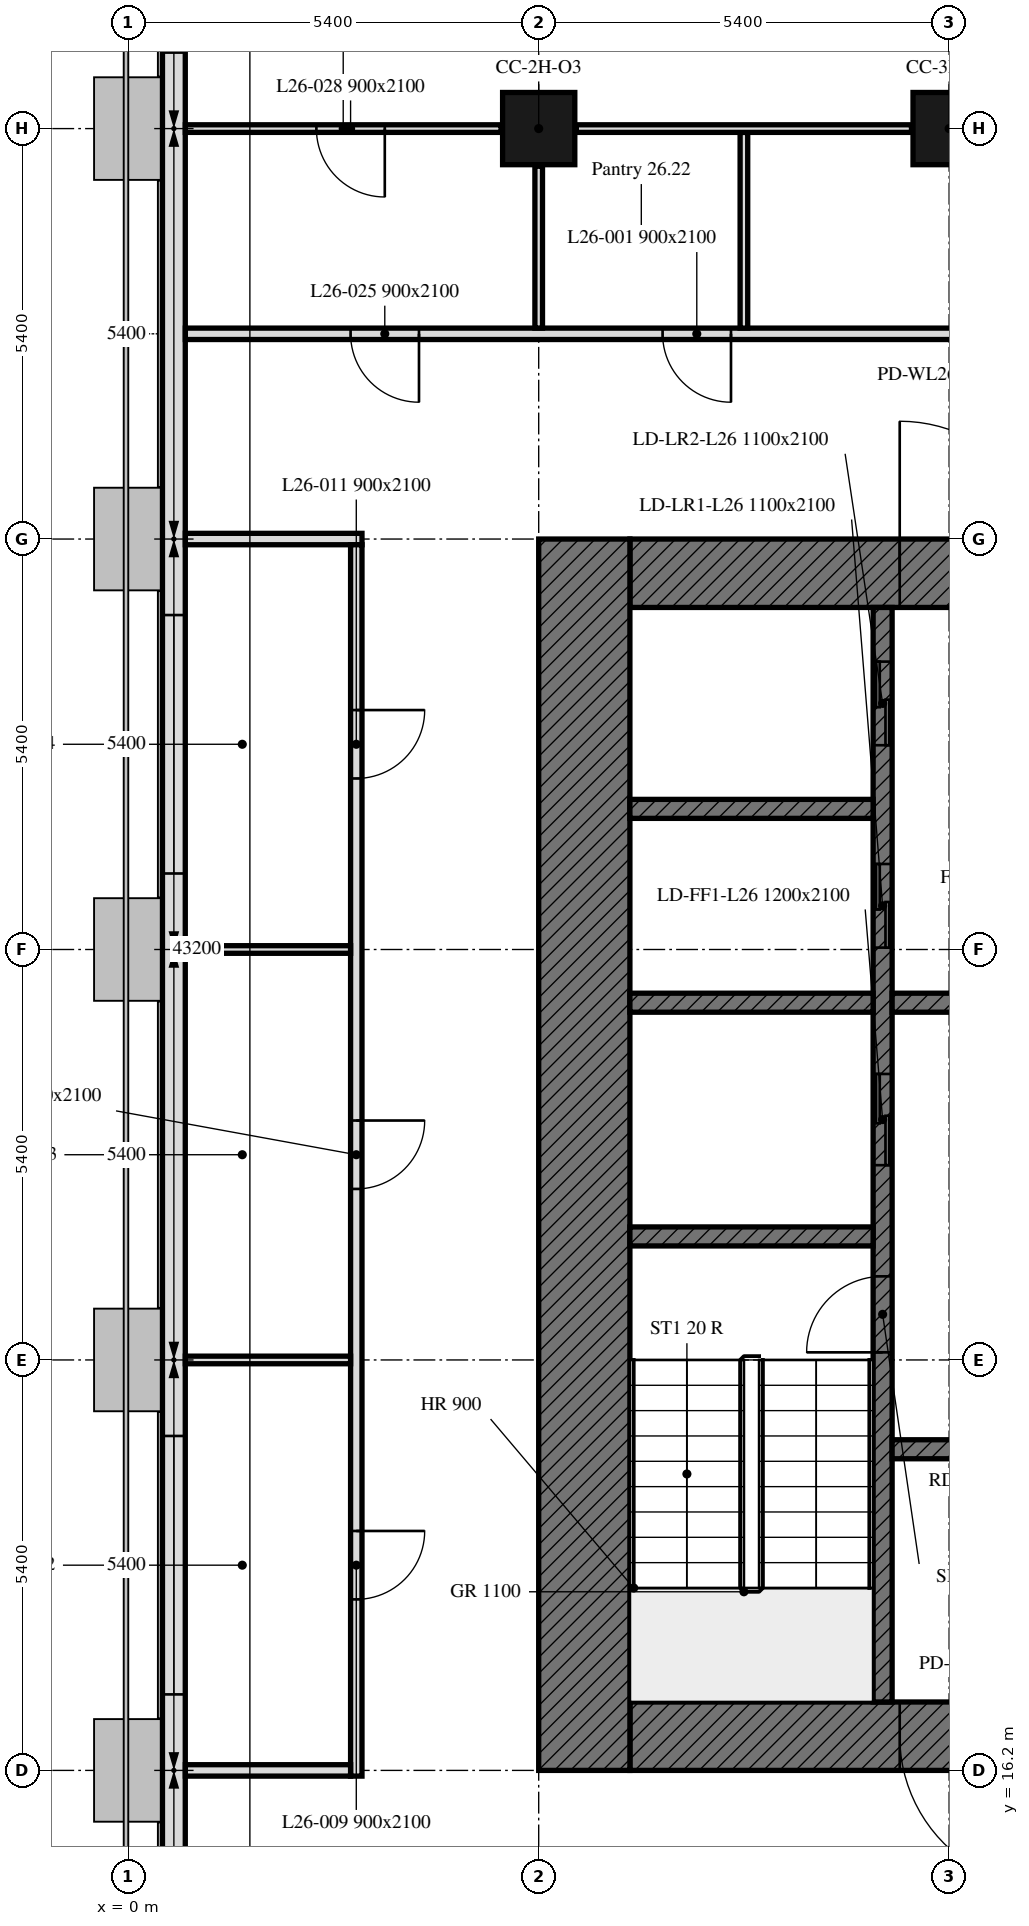
"""IFC4 building model, lengths in metres.
Left out: names, types, materials, properties, quantities, classifications, styles, units other than length and angle.
Written with IfcOpenShell. Run it as: python <this file> out.ifc"""

import sys

from ifc_helpers import new_model, si_unit, direction, frame, frame_2d, origin, origin_2d, place, context, subcontext, project, spatial, rectangle, extrude, element, fill, save


model = new_model("IFC4")
c1 = context("Model", 3, precision=1e-05, world=origin(), true_north=direction((0.0, 1.0)))
c2 = subcontext(c1, "Body", "Model", "MODEL_VIEW")
j1 = project(units=[si_unit("LENGTHUNIT", "METRE"), si_unit("PLANEANGLEUNIT", "RADIAN")], contexts=[c1])
p1 = place(None, origin())
s1 = spatial("IfcSite", under=j1, at=p1, CompositionType="ELEMENT")
p2 = place(p1, origin())
s2 = spatial("IfcBuilding", under=s1, at=p2, CompositionType="ELEMENT")
p3 = place(p2, frame((0.0, 0.0, 110.6)))
s3 = spatial("IfcBuildingStorey", under=s2, at=p3, CompositionType="ELEMENT", Elevation=110.6)
for number, where, z_axis, x_axis in (
    (1, (5.4, 37.8, 0.0), (0.0, 0.0, 1.0), (1.0, 0.0, 0.0)),
    (2, (10.8, 37.8, 0.0), (0.0, 0.0, 1.0), (1.0, 0.0, 0.0)),
):
    element("IfcColumn", number, at=place(p3, frame(where, z_axis=z_axis, x_axis=x_axis)), inside=s3, PredefinedType="COLUMN", context=c2, shape_type="SweptSolid", body=[
        extrude(rectangle(XDim=0.95, YDim=0.95, at=origin_2d()), origin(), (0.0, 0.0, 1.0), 3.5),
    ])
p4 = place(p3, frame((0.6, 43.014, 0.0), z_axis=(0.0, 0.0, 1.0), x_axis=(0.0, -1.0, 0.0)))
e3 = element("IfcWall", 3, at=p4, inside=s3, PredefinedType="SOLIDWALL", context=c2, shape_type="SweptSolid", body=[
    extrude(rectangle(XDim=32.027, YDim=0.3, at=frame_2d((16.014, 0.0))), origin(), (0.0, 0.0, 1.0), 3.5),
])
p5 = place(p4, frame((0.814, 0.0, 0.9)))
e4 = element("IfcOpeningElement", 4, at=p5, cuts=e3, PredefinedType="OPENING", context=c2, shape_type="SweptSolid", body=[
    extrude(rectangle(XDim=3.4, YDim=1.7, at=frame_2d((1.7, 0.85))), frame((0.0, 0.16, 0.0), z_axis=(0.0, -1.0, 0.0), x_axis=(1.0, 0.0, 0.0)), (0.0, 0.0, 1.0), 0.32),
])
p6 = place(p4, frame((11.614, 0.0, 0.9)))
e5 = element("IfcOpeningElement", 5, at=p6, cuts=e3, PredefinedType="OPENING", context=c2, shape_type="SweptSolid", body=[
    extrude(rectangle(XDim=3.4, YDim=1.7, at=frame_2d((1.7, 0.85))), frame((0.0, 0.16, 0.0), z_axis=(0.0, -1.0, 0.0), x_axis=(1.0, 0.0, 0.0)), (0.0, 0.0, 1.0), 0.32),
])
p7 = place(p4, frame((22.414, 0.0, 0.9)))
e6 = element("IfcOpeningElement", 6, at=p7, cuts=e3, PredefinedType="OPENING", context=c2, shape_type="SweptSolid", body=[
    extrude(rectangle(XDim=3.4, YDim=1.7, at=frame_2d((1.7, 0.85))), frame((0.0, 0.16, 0.0), z_axis=(0.0, -1.0, 0.0), x_axis=(1.0, 0.0, 0.0)), (0.0, 0.0, 1.0), 0.32),
])
p8 = place(p3, frame((17.7, 16.65, 0.0), z_axis=(0.0, 0.0, 1.0), x_axis=(-1.0, 0.0, 0.0)))
e7 = element("IfcWall", 7, at=p8, inside=s3, PredefinedType="SOLIDWALL", context=c2, shape_type="SweptSolid", body=[
    extrude(rectangle(XDim=11.1, YDim=0.9, at=frame_2d((5.55, 0.0))), origin(), (0.0, 0.0, 1.0), 3.5),
])
p9 = place(p8, frame((5.55, 0.0, 0.0)))
e8 = element("IfcOpeningElement", 8, at=p9, cuts=e7, PredefinedType="OPENING", context=c2, shape_type="SweptSolid", body=[
    extrude(rectangle(XDim=2.0, YDim=2.4, at=frame_2d((1.0, 1.2))), frame((0.0, 0.45, 0.0), z_axis=(0.0, -1.0, 0.0), x_axis=(1.0, 0.0, 0.0)), (0.0, 0.0, 1.0), 0.9),
])
p10 = place(p3, frame((6.6, 31.95, 0.0), z_axis=(0.0, 0.0, 1.0), x_axis=(1.0, 0.0, 0.0)))
e9 = element("IfcWall", 9, at=p10, inside=s3, PredefinedType="SOLIDWALL", context=c2, shape_type="SweptSolid", body=[
    extrude(rectangle(XDim=11.1, YDim=0.9, at=frame_2d((5.55, 0.0))), origin(), (0.0, 0.0, 1.0), 3.5),
])
p11 = place(p10, frame((3.55, 0.0, 0.0)))
e10 = element("IfcOpeningElement", 10, at=p11, cuts=e9, PredefinedType="OPENING", context=c2, shape_type="SweptSolid", body=[
    extrude(rectangle(XDim=2.0, YDim=2.4, at=frame_2d((1.0, 1.2))), frame((0.0, 0.45, 0.0), z_axis=(0.0, -1.0, 0.0), x_axis=(1.0, 0.0, 0.0)), (0.0, 0.0, 1.0), 0.9),
])
p12 = place(p3, frame((6.0, 16.2, 0.0), z_axis=(0.0, 0.0, 1.0), x_axis=(0.0, 1.0, 0.0)))
e11 = element("IfcWall", 11, at=p12, inside=s3, PredefinedType="SOLIDWALL", context=c2, shape_type="SweptSolid", body=[
    extrude(rectangle(XDim=16.2, YDim=1.2, at=frame_2d((8.1, 0.0))), origin(), (0.0, 0.0, 1.0), 3.5),
])
p13 = place(p3, frame((9.925, 17.1, 0.0), z_axis=(0.0, 0.0, 1.0), x_axis=(0.0, 1.0, 0.0)))
e12 = element("IfcWall", 12, at=p13, inside=s3, PredefinedType="SOLIDWALL", context=c2, shape_type="SweptSolid", body=[
    extrude(rectangle(XDim=14.4, YDim=0.25, at=frame_2d((7.2, 0.0))), origin(), (0.0, 0.0, 1.0), 3.5),
])
p14 = place(p13, frame((4.6, 0.0, 0.0)))
e13 = element("IfcOpeningElement", 13, at=p14, cuts=e12, PredefinedType="OPENING", context=c2, shape_type="SweptSolid", body=[
    extrude(rectangle(XDim=1.0, YDim=2.1, at=frame_2d((0.5, 1.05))), frame((0.0, 0.125, 0.0), z_axis=(0.0, -1.0, 0.0), x_axis=(1.0, 0.0, 0.0)), (0.0, 0.0, 1.0), 0.25),
])
p15 = place(p13, frame((7.062, 0.0, 0.0)))
e14 = element("IfcOpeningElement", 14, at=p15, cuts=e12, PredefinedType="OPENING", context=c2, shape_type="SweptSolid", body=[
    extrude(rectangle(XDim=1.2, YDim=2.1, at=frame_2d((0.6, 1.05))), frame((0.0, 0.125, 0.0), z_axis=(0.0, -1.0, 0.0), x_axis=(1.0, 0.0, 0.0)), (0.0, 0.0, 1.0), 0.25),
])
p16 = place(p13, frame((9.925, 0.0, 0.0)))
e15 = element("IfcOpeningElement", 15, at=p16, cuts=e12, PredefinedType="OPENING", context=c2, shape_type="SweptSolid", body=[
    extrude(rectangle(XDim=1.1, YDim=2.1, at=frame_2d((0.55, 1.05))), frame((0.0, 0.125, 0.0), z_axis=(0.0, -1.0, 0.0), x_axis=(1.0, 0.0, 0.0)), (0.0, 0.0, 1.0), 0.25),
])
p17 = place(p13, frame((12.587, 0.0, 0.0)))
e16 = element("IfcOpeningElement", 16, at=p17, cuts=e12, PredefinedType="OPENING", context=c2, shape_type="SweptSolid", body=[
    extrude(rectangle(XDim=1.1, YDim=2.1, at=frame_2d((0.55, 1.05))), frame((0.0, 0.125, 0.0), z_axis=(0.0, -1.0, 0.0), x_axis=(1.0, 0.0, 0.0)), (0.0, 0.0, 1.0), 0.25),
])
for number, where, z_axis, x_axis in (
    (17, (6.6, 23.225, 0.0), (0.0, 0.0, 1.0), (1.0, 0.0, 0.0)),
    (18, (6.6, 26.3, 0.0), (0.0, 0.0, 1.0), (1.0, 0.0, 0.0)),
):
    element("IfcWall", number, at=place(p3, frame(where, z_axis=z_axis, x_axis=x_axis)), inside=s3, PredefinedType="SOLIDWALL", context=c2, shape_type="SweptSolid", body=[
        extrude(rectangle(XDim=3.2, YDim=0.25, at=frame_2d((1.6, 0.0))), origin(), (0.0, 0.0, 1.0), 3.5),
    ])
for number, where, z_axis, x_axis in (
    (19, (10.05, 26.3, 0.0), (0.0, 0.0, 1.0), (1.0, 0.0, 0.0)),
    (20, (10.05, 20.425, 0.0), (0.0, 0.0, 1.0), (1.0, 0.0, 0.0)),
):
    element("IfcWall", number, at=place(p3, frame(where, z_axis=z_axis, x_axis=x_axis)), inside=s3, PredefinedType="SOLIDWALL", context=c2, shape_type="SweptSolid", body=[
        extrude(rectangle(XDim=2.75, YDim=0.25, at=frame_2d((1.375, 0.0))), origin(), (0.0, 0.0, 1.0), 3.5),
    ])
p18 = place(p3, frame((6.6, 28.85, 0.0), z_axis=(0.0, 0.0, 1.0), x_axis=(1.0, 0.0, 0.0)))
e21 = element("IfcWall", 21, at=p18, inside=s3, PredefinedType="SOLIDWALL", context=c2, shape_type="SweptSolid", body=[
    extrude(rectangle(XDim=3.2, YDim=0.25, at=frame_2d((1.6, 0.0))), origin(), (0.0, 0.0, 1.0), 3.5),
])
p19 = place(p3, frame((24.2, 35.1, 0.0), z_axis=(0.0, 0.0, 1.0), x_axis=(-1.0, 0.0, 0.0)))
e22 = element("IfcWall", 22, at=p19, inside=s3, PredefinedType="PARTITIONING", context=c2, shape_type="SweptSolid", body=[
    extrude(rectangle(XDim=23.449, YDim=0.15, at=frame_2d((11.725, 0.0))), origin(), (0.0, 0.0, 1.0), 2.75),
])
p20 = place(p19, frame((16.27, 0.0, 0.0)))
e23 = element("IfcOpeningElement", 23, at=p20, cuts=e22, PredefinedType="OPENING", context=c2, shape_type="SweptSolid", body=[
    extrude(rectangle(XDim=0.9, YDim=2.1, at=frame_2d((0.45, 1.05))), frame((0.0, 0.075, 0.0), z_axis=(0.0, -1.0, 0.0), x_axis=(1.0, 0.0, 0.0)), (0.0, 0.0, 1.0), 0.15),
])
p21 = place(p19, frame((20.375, 0.0, 0.0)))
e24 = element("IfcOpeningElement", 24, at=p21, cuts=e22, PredefinedType="OPENING", context=c2, shape_type="SweptSolid", body=[
    extrude(rectangle(XDim=0.9, YDim=2.1, at=frame_2d((0.45, 1.05))), frame((0.0, 0.075, 0.0), z_axis=(0.0, -1.0, 0.0), x_axis=(1.0, 0.0, 0.0)), (0.0, 0.0, 1.0), 0.15),
])
p22 = place(p3, frame((0.751, 32.4, 0.0), z_axis=(0.0, 0.0, 1.0), x_axis=(1.0, 0.0, 0.0)))
e25 = element("IfcWall", 25, at=p22, inside=s3, PredefinedType="PARTITIONING", context=c2, shape_type="SweptSolid", body=[
    extrude(rectangle(XDim=2.324, YDim=0.15, at=frame_2d((1.162, 0.0))), origin(), (0.0, 0.0, 1.0), 2.75),
])
p23 = place(p3, frame((3.0, 32.325, 0.0), z_axis=(0.0, 0.0, 1.0), x_axis=(0.0, -1.0, 0.0)))
e26 = element("IfcWall", 26, at=p23, inside=s3, PredefinedType="PARTITIONING", context=c2, shape_type="SweptSolid", body=[
    extrude(rectangle(XDim=16.2, YDim=0.15, at=frame_2d((8.1, 0.0))), origin(), (0.0, 0.0, 1.0), 2.75),
])
p24 = place(p23, frame((12.975, 0.0, 0.0)))
e27 = element("IfcOpeningElement", 27, at=p24, cuts=e26, PredefinedType="OPENING", context=c2, shape_type="SweptSolid", body=[
    extrude(rectangle(XDim=0.9, YDim=2.1, at=frame_2d((0.45, 1.05))), frame((0.0, 0.075, 0.0), z_axis=(0.0, -1.0, 0.0), x_axis=(1.0, 0.0, 0.0)), (0.0, 0.0, 1.0), 0.15),
])
p25 = place(p23, frame((7.575, 0.0, 0.0)))
e28 = element("IfcOpeningElement", 28, at=p25, cuts=e26, PredefinedType="OPENING", context=c2, shape_type="SweptSolid", body=[
    extrude(rectangle(XDim=0.9, YDim=2.1, at=frame_2d((0.45, 1.05))), frame((0.0, 0.075, 0.0), z_axis=(0.0, -1.0, 0.0), x_axis=(1.0, 0.0, 0.0)), (0.0, 0.0, 1.0), 0.15),
])
p26 = place(p23, frame((2.175, 0.0, 0.0)))
e29 = element("IfcOpeningElement", 29, at=p26, cuts=e26, PredefinedType="OPENING", context=c2, shape_type="SweptSolid", body=[
    extrude(rectangle(XDim=0.9, YDim=2.1, at=frame_2d((0.45, 1.05))), frame((0.0, 0.075, 0.0), z_axis=(0.0, -1.0, 0.0), x_axis=(1.0, 0.0, 0.0)), (0.0, 0.0, 1.0), 0.15),
])
p27 = place(p3, frame((2.925, 16.2, 0.0), z_axis=(0.0, 0.0, 1.0), x_axis=(-1.0, 0.0, 0.0)))
e30 = element("IfcWall", 30, at=p27, inside=s3, PredefinedType="PARTITIONING", context=c2, shape_type="SweptSolid", body=[
    extrude(rectangle(XDim=2.174, YDim=0.15, at=frame_2d((1.087, 0.0))), origin(), (0.0, 0.0, 1.0), 2.75),
])
p28 = place(p3, frame((4.905, 37.8, 0.0), z_axis=(0.0, 0.0, 1.0), x_axis=(-1.0, 0.0, 0.0)))
e31 = element("IfcWall", 31, at=p28, inside=s3, PredefinedType="PARTITIONING", context=c2, shape_type="SweptSolid", body=[
    extrude(rectangle(XDim=4.154, YDim=0.1, at=frame_2d((2.077, 0.0))), origin(), (0.0, 0.0, 1.0), 2.75),
])
p29 = place(p28, frame((1.53, 0.0, 0.0)))
e32 = element("IfcOpeningElement", 32, at=p29, cuts=e31, PredefinedType="OPENING", context=c2, shape_type="SweptSolid", body=[
    extrude(rectangle(XDim=0.9, YDim=2.1, at=frame_2d((0.45, 1.05))), frame((0.0, 0.05, 0.0), z_axis=(0.0, -1.0, 0.0), x_axis=(1.0, 0.0, 0.0)), (0.0, 0.0, 1.0), 0.1),
])
p30 = place(p3, frame((5.4, 35.175, 0.0), z_axis=(0.0, 0.0, 1.0), x_axis=(0.0, 1.0, 0.0)))
e33 = element("IfcWall", 33, at=p30, inside=s3, PredefinedType="PARTITIONING", context=c2, shape_type="SweptSolid", body=[
    extrude(rectangle(XDim=2.13, YDim=0.1, at=frame_2d((1.065, 0.0))), origin(), (0.0, 0.0, 1.0), 3.5),
])
p31 = place(p3, frame((8.1, 35.175, 0.0), z_axis=(0.0, 0.0, 1.0), x_axis=(0.0, 1.0, 0.0)))
e34 = element("IfcWall", 34, at=p31, inside=s3, PredefinedType="PARTITIONING", context=c2, shape_type="SweptSolid", body=[
    extrude(rectangle(XDim=2.575, YDim=0.1, at=frame_2d((1.288, 0.0))), origin(), (0.0, 0.0, 1.0), 3.5),
])
p32 = place(p3, frame((10.305, 37.8, 0.0), z_axis=(0.0, 0.0, 1.0), x_axis=(-1.0, 0.0, 0.0)))
e35 = element("IfcWall", 35, at=p32, inside=s3, PredefinedType="PARTITIONING", context=c2, shape_type="SweptSolid", body=[
    extrude(rectangle(XDim=4.41, YDim=0.1, at=frame_2d((2.205, 0.0))), origin(), (0.0, 0.0, 1.0), 2.75),
])
for number, where, z_axis, x_axis in (
    (36, (2.925, 21.6, 0.0), (0.0, 0.0, 1.0), (-1.0, 0.0, 0.0)),
    (37, (2.925, 27.0, 0.0), (0.0, 0.0, 1.0), (-1.0, 0.0, 0.0)),
):
    element("IfcWall", number, at=place(p3, frame(where, z_axis=z_axis, x_axis=x_axis)), inside=s3, PredefinedType="PARTITIONING", context=c2, shape_type="SweptSolid", body=[
        extrude(rectangle(XDim=2.174, YDim=0.1, at=frame_2d((1.087, 0.0))), origin(), (0.0, 0.0, 1.0), 2.75),
    ])
p33 = place(p6, origin())
e38 = element("IfcWindow", 38, at=p33, inside=s3, PartitioningType="SINGLE_PANEL", PredefinedType="WINDOW", context=c2, shape_type="SweptSolid", body=[
    extrude(rectangle(XDim=3.4, YDim=1.7, at=frame_2d((1.7, 0.85))), frame((0.0, 0.03, 0.0), z_axis=(0.0, -1.0, 0.0), x_axis=(1.0, 0.0, 0.0)), (0.0, 0.0, 1.0), 0.06),
])
fill(e5, e38)
p34 = place(p7, origin())
e39 = element("IfcWindow", 39, at=p34, inside=s3, PartitioningType="SINGLE_PANEL", PredefinedType="WINDOW", context=c2, shape_type="SweptSolid", body=[
    extrude(rectangle(XDim=3.4, YDim=1.7, at=frame_2d((1.7, 0.85))), frame((0.0, 0.03, 0.0), z_axis=(0.0, -1.0, 0.0), x_axis=(1.0, 0.0, 0.0)), (0.0, 0.0, 1.0), 0.06),
])
fill(e6, e39)
p35 = place(p9, origin())
e40 = element("IfcDoor", 40, at=p35, inside=s3, OperationType="DOUBLE_DOOR_SINGLE_SWING", PredefinedType="DOOR", context=c2, shape_type="SweptSolid", body=[
    extrude(rectangle(XDim=2.0, YDim=2.4, at=frame_2d((1.0, 1.2))), frame((0.0, 0.025, 0.0), z_axis=(0.0, -1.0, 0.0), x_axis=(1.0, 0.0, 0.0)), (0.0, 0.0, 1.0), 0.05),
])
fill(e8, e40)
p36 = place(p11, origin())
e41 = element("IfcDoor", 41, at=p36, inside=s3, OperationType="DOUBLE_DOOR_SINGLE_SWING", PredefinedType="DOOR", context=c2, shape_type="SweptSolid", body=[
    extrude(rectangle(XDim=2.0, YDim=2.4, at=frame_2d((1.0, 1.2))), frame((0.0, 0.025, 0.0), z_axis=(0.0, -1.0, 0.0), x_axis=(1.0, 0.0, 0.0)), (0.0, 0.0, 1.0), 0.05),
])
fill(e10, e41)
p37 = place(p14, origin())
e42 = element("IfcDoor", 42, at=p37, inside=s3, OperationType="SINGLE_SWING_LEFT", PredefinedType="DOOR", context=c2, shape_type="SweptSolid", body=[
    extrude(rectangle(XDim=1.0, YDim=2.1, at=frame_2d((0.5, 1.05))), frame((0.0, 0.025, 0.0), z_axis=(0.0, -1.0, 0.0), x_axis=(1.0, 0.0, 0.0)), (0.0, 0.0, 1.0), 0.05),
])
fill(e13, e42)
p38 = place(p15, origin())
e43 = element("IfcDoor", 43, at=p38, inside=s3, OperationType="DOUBLE_DOOR_SLIDING", PredefinedType="DOOR", context=c2, shape_type="SweptSolid", body=[
    extrude(rectangle(XDim=1.2, YDim=2.1, at=frame_2d((0.6, 1.05))), frame((0.0, 0.025, 0.0), z_axis=(0.0, -1.0, 0.0), x_axis=(1.0, 0.0, 0.0)), (0.0, 0.0, 1.0), 0.05),
])
fill(e14, e43)
p39 = place(p16, origin())
e44 = element("IfcDoor", 44, at=p39, inside=s3, OperationType="DOUBLE_DOOR_SLIDING", PredefinedType="DOOR", context=c2, shape_type="SweptSolid", body=[
    extrude(rectangle(XDim=1.1, YDim=2.1, at=frame_2d((0.55, 1.05))), frame((0.0, 0.025, 0.0), z_axis=(0.0, -1.0, 0.0), x_axis=(1.0, 0.0, 0.0)), (0.0, 0.0, 1.0), 0.05),
])
fill(e15, e44)
p40 = place(p17, origin())
e45 = element("IfcDoor", 45, at=p40, inside=s3, OperationType="DOUBLE_DOOR_SLIDING", PredefinedType="DOOR", context=c2, shape_type="SweptSolid", body=[
    extrude(rectangle(XDim=1.1, YDim=2.1, at=frame_2d((0.55, 1.05))), frame((0.0, 0.025, 0.0), z_axis=(0.0, -1.0, 0.0), x_axis=(1.0, 0.0, 0.0)), (0.0, 0.0, 1.0), 0.05),
])
fill(e16, e45)
p41 = place(p20, origin())
e46 = element("IfcDoor", 46, at=p41, inside=s3, OperationType="SINGLE_SWING_LEFT", PredefinedType="DOOR", context=c2, shape_type="SweptSolid", body=[
    extrude(rectangle(XDim=0.9, YDim=2.1, at=frame_2d((0.45, 1.05))), frame((0.0, 0.025, 0.0), z_axis=(0.0, -1.0, 0.0), x_axis=(1.0, 0.0, 0.0)), (0.0, 0.0, 1.0), 0.05),
])
fill(e23, e46)
p42 = place(p24, origin())
e47 = element("IfcDoor", 47, at=p42, inside=s3, OperationType="SINGLE_SWING_RIGHT", PredefinedType="DOOR", context=c2, shape_type="SweptSolid", body=[
    extrude(rectangle(XDim=0.9, YDim=2.1, at=frame_2d((0.45, 1.05))), frame((0.0, 0.025, 0.0), z_axis=(0.0, -1.0, 0.0), x_axis=(1.0, 0.0, 0.0)), (0.0, 0.0, 1.0), 0.05),
])
fill(e27, e47)
p43 = place(p25, origin())
e48 = element("IfcDoor", 48, at=p43, inside=s3, OperationType="SINGLE_SWING_RIGHT", PredefinedType="DOOR", context=c2, shape_type="SweptSolid", body=[
    extrude(rectangle(XDim=0.9, YDim=2.1, at=frame_2d((0.45, 1.05))), frame((0.0, 0.025, 0.0), z_axis=(0.0, -1.0, 0.0), x_axis=(1.0, 0.0, 0.0)), (0.0, 0.0, 1.0), 0.05),
])
fill(e28, e48)
p44 = place(p26, origin())
e49 = element("IfcDoor", 49, at=p44, inside=s3, OperationType="SINGLE_SWING_RIGHT", PredefinedType="DOOR", context=c2, shape_type="SweptSolid", body=[
    extrude(rectangle(XDim=0.9, YDim=2.1, at=frame_2d((0.45, 1.05))), frame((0.0, 0.025, 0.0), z_axis=(0.0, -1.0, 0.0), x_axis=(1.0, 0.0, 0.0)), (0.0, 0.0, 1.0), 0.05),
])
fill(e29, e49)
p45 = place(p21, origin())
e50 = element("IfcDoor", 50, at=p45, inside=s3, OperationType="SINGLE_SWING_LEFT", PredefinedType="DOOR", context=c2, shape_type="SweptSolid", body=[
    extrude(rectangle(XDim=0.9, YDim=2.1, at=frame_2d((0.45, 1.05))), frame((0.0, 0.025, 0.0), z_axis=(0.0, -1.0, 0.0), x_axis=(1.0, 0.0, 0.0)), (0.0, 0.0, 1.0), 0.05),
])
fill(e24, e50)
p46 = place(p29, origin())
e51 = element("IfcDoor", 51, at=p46, inside=s3, OperationType="SINGLE_SWING_RIGHT", PredefinedType="DOOR", context=c2, shape_type="SweptSolid", body=[
    extrude(rectangle(XDim=0.9, YDim=2.1, at=frame_2d((0.45, 1.05))), frame((0.0, 0.025, 0.0), z_axis=(0.0, -1.0, 0.0), x_axis=(1.0, 0.0, 0.0)), (0.0, 0.0, 1.0), 0.05),
])
fill(e32, e51)
save(model, sys.argv[1])
